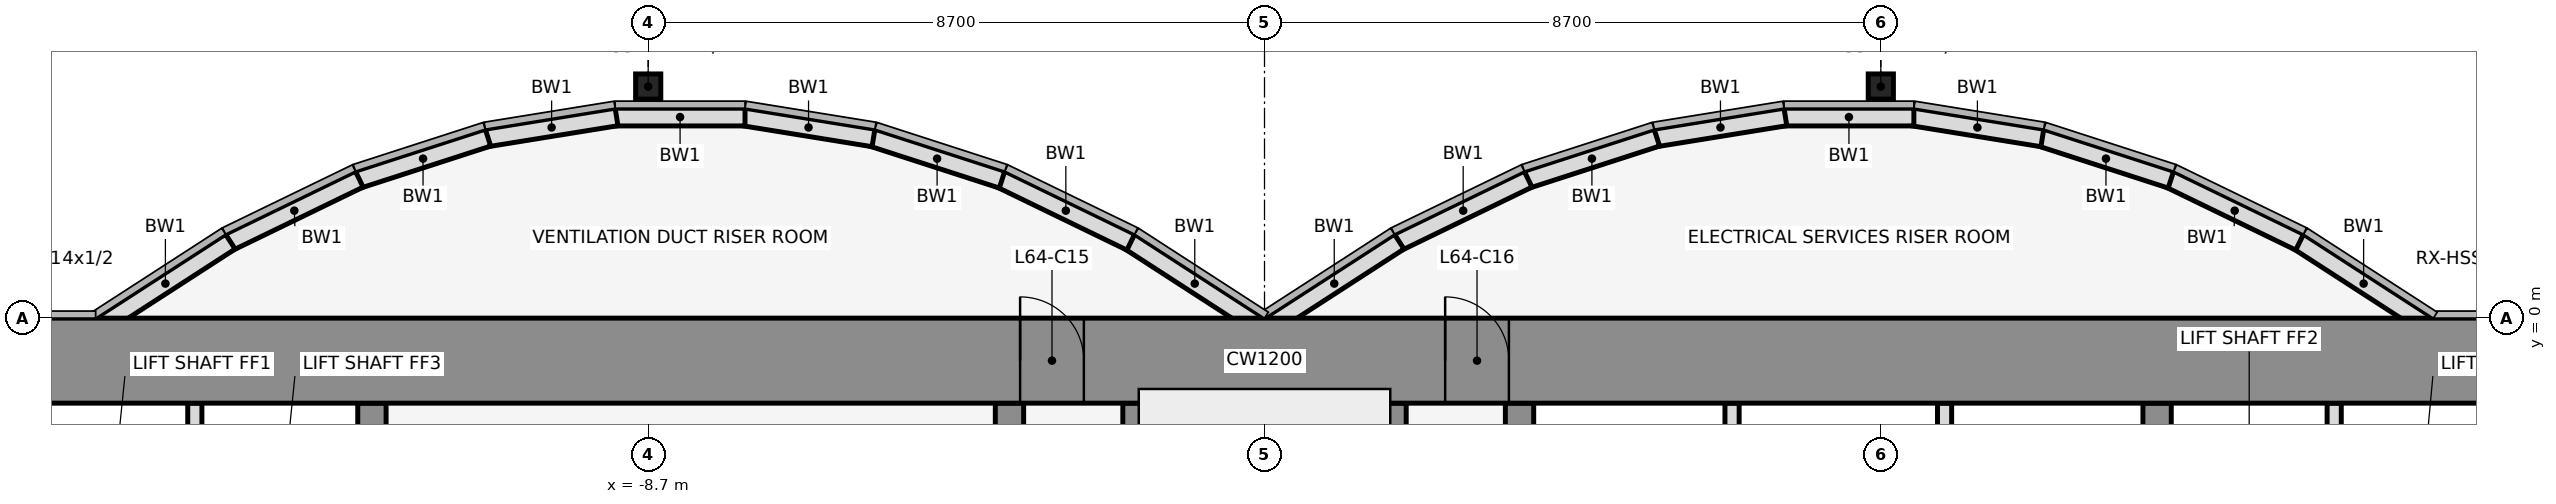
"""IFC4 building model, lengths in metres.
Left out: names, types, materials, properties, quantities, classifications, styles, units other than length and angle.
Written with IfcOpenShell. Run it as: python <this file> out.ifc"""

import sys

from ifc_helpers import new_model, si_unit, direction, frame, frame_2d, origin, origin_2d, place, context, subcontext, project, spatial, rectangle, hollow_rectangle, extrude, element, fill, save


model = new_model("IFC4")
c1 = context("Model", 3, precision=1e-05, world=origin(), true_north=direction((0.0, 1.0)))
c2 = subcontext(c1, "Body", "Model", "MODEL_VIEW")
j1 = project(units=[si_unit("LENGTHUNIT", "METRE"), si_unit("PLANEANGLEUNIT", "RADIAN")], contexts=[c1])
p1 = place(None, origin())
s1 = spatial("IfcSite", under=j1, at=p1, CompositionType="ELEMENT")
p2 = place(p1, origin())
s2 = spatial("IfcBuilding", under=s1, at=p2, CompositionType="ELEMENT")
p3 = place(p2, frame((0.0, 0.0, 283.4)))
s3 = spatial("IfcBuildingStorey", under=s2, at=p3, CompositionType="ELEMENT", Elevation=283.4)
for number, where, z_axis, x_axis in (
    (1, (-8.7, 3.269, 0.0), (0.0, 0.0, 1.0), (1.0, 0.0, 0.0)),
    (2, (8.7, 3.269, 0.0), (0.0, 0.0, 1.0), (1.0, 0.0, 0.0)),
):
    element("IfcColumn", number, at=place(p3, frame(where, z_axis=z_axis, x_axis=x_axis)), inside=s3, PredefinedType="COLUMN", context=c2, shape_type="SweptSolid", body=[
        extrude(hollow_rectangle(XDim=0.356, YDim=0.356, WallThickness=0.012, at=origin_2d()), origin(), (0.0, 0.0, 1.0), 4.2),
    ])
p4 = place(p3, frame((16.432, -0.105, 0.0), z_axis=(0.0, 0.0, 1.0), x_axis=(-0.83981312244, 0.542875602121, 0.0)))
e3 = element("IfcWall", 3, at=p4, inside=s3, PredefinedType="STANDARD", context=c2, shape_type="SweptSolid", body=[
    extrude(rectangle(XDim=2.183, YDim=0.25, at=frame_2d((1.091, 0.0))), origin(), (0.0, 0.0, 1.0), 4.0),
])
p5 = place(p3, frame((14.612, 1.073, 0.0), z_axis=(0.0, 0.0, 1.0), x_axis=(-0.89982408427, 0.436252928206, 0.0)))
e4 = element("IfcWall", 4, at=p5, inside=s3, PredefinedType="STANDARD", context=c2, shape_type="SweptSolid", body=[
    extrude(rectangle(XDim=2.038, YDim=0.25, at=frame_2d((1.019, 0.0))), origin(), (0.0, 0.0, 1.0), 4.0),
])
p6 = place(p3, frame((12.795, 1.955, 0.0), z_axis=(0.0, 0.0, 1.0), x_axis=(-0.951495806175, 0.307661714928, 0.0)))
e5 = element("IfcWall", 5, at=p6, inside=s3, PredefinedType="STANDARD", context=c2, shape_type="SweptSolid", body=[
    extrude(rectangle(XDim=1.927, YDim=0.25, at=frame_2d((0.963, 0.0))), origin(), (0.0, 0.0, 1.0), 4.0),
])
p7 = place(p3, frame((10.98, 2.543, 0.0), z_axis=(0.0, 0.0, 1.0), x_axis=(-0.987181718931, 0.159600293885, 0.0)))
e6 = element("IfcWall", 6, at=p7, inside=s3, PredefinedType="STANDARD", context=c2, shape_type="SweptSolid", body=[
    extrude(rectangle(XDim=1.857, YDim=0.25, at=frame_2d((0.929, 0.0))), origin(), (0.0, 0.0, 1.0), 4.0),
])
p8 = place(p3, frame((9.167, 2.838, 0.0), z_axis=(0.0, 0.0, 1.0), x_axis=(-1.0, 0.0, 0.0)))
e7 = element("IfcWall", 7, at=p8, inside=s3, PredefinedType="STANDARD", context=c2, shape_type="SweptSolid", body=[
    extrude(rectangle(XDim=1.833, YDim=0.25, at=frame_2d((0.917, 0.0))), origin(), (0.0, 0.0, 1.0), 4.0),
])
p9 = place(p3, frame((7.353, 2.84, 0.0), z_axis=(0.0, 0.0, 1.0), x_axis=(-0.987181718931, -0.159600293885, 0.0)))
e8 = element("IfcWall", 8, at=p9, inside=s3, PredefinedType="STANDARD", context=c2, shape_type="SweptSolid", body=[
    extrude(rectangle(XDim=1.857, YDim=0.25, at=frame_2d((0.929, 0.0))), origin(), (0.0, 0.0, 1.0), 4.0),
])
p10 = place(p3, frame((5.538, 2.548, 0.0), z_axis=(0.0, 0.0, 1.0), x_axis=(-0.951495806175, -0.307661714928, 0.0)))
e9 = element("IfcWall", 9, at=p10, inside=s3, PredefinedType="STANDARD", context=c2, shape_type="SweptSolid", body=[
    extrude(rectangle(XDim=1.927, YDim=0.25, at=frame_2d((0.963, 0.0))), origin(), (0.0, 0.0, 1.0), 4.0),
])
p11 = place(p3, frame((3.721, 1.962, 0.0), z_axis=(0.0, 0.0, 1.0), x_axis=(-0.89982408427, -0.436252928206, 0.0)))
e10 = element("IfcWall", 10, at=p11, inside=s3, PredefinedType="STANDARD", context=c2, shape_type="SweptSolid", body=[
    extrude(rectangle(XDim=2.038, YDim=0.25, at=frame_2d((1.019, 0.0))), origin(), (0.0, 0.0, 1.0), 4.0),
])
for number, where, z_axis, x_axis in (
    (11, (1.901, 1.08, 0.0), (0.0, 0.0, 1.0), (-0.84, -0.543, 0.0)),
    (12, (-0.068, -0.105, 0.0), (0.0, 0.0, 1.0), (-0.84, 0.543, 0.0)),
):
    element("IfcWall", number, at=place(p3, frame(where, z_axis=z_axis, x_axis=x_axis)), inside=s3, PredefinedType="STANDARD", context=c2, shape_type="SweptSolid", body=[
        extrude(rectangle(XDim=2.183, YDim=0.25, at=frame_2d((1.091, 0.0))), origin(), (0.0, 0.0, 1.0), 4.0),
    ])
p12 = place(p3, frame((-1.888, 1.073, 0.0), z_axis=(0.0, 0.0, 1.0), x_axis=(-0.89982408427, 0.436252928206, 0.0)))
e13 = element("IfcWall", 13, at=p12, inside=s3, PredefinedType="STANDARD", context=c2, shape_type="SweptSolid", body=[
    extrude(rectangle(XDim=2.038, YDim=0.25, at=frame_2d((1.019, 0.0))), origin(), (0.0, 0.0, 1.0), 4.0),
])
p13 = place(p3, frame((-3.705, 1.955, 0.0), z_axis=(0.0, 0.0, 1.0), x_axis=(-0.951495806175, 0.307661714928, 0.0)))
e14 = element("IfcWall", 14, at=p13, inside=s3, PredefinedType="STANDARD", context=c2, shape_type="SweptSolid", body=[
    extrude(rectangle(XDim=1.927, YDim=0.25, at=frame_2d((0.963, 0.0))), origin(), (0.0, 0.0, 1.0), 4.0),
])
p14 = place(p3, frame((-5.52, 2.543, 0.0), z_axis=(0.0, 0.0, 1.0), x_axis=(-0.987181718931, 0.159600293885, 0.0)))
e15 = element("IfcWall", 15, at=p14, inside=s3, PredefinedType="STANDARD", context=c2, shape_type="SweptSolid", body=[
    extrude(rectangle(XDim=1.857, YDim=0.25, at=frame_2d((0.929, 0.0))), origin(), (0.0, 0.0, 1.0), 4.0),
])
p15 = place(p3, frame((-7.333, 2.838, 0.0), z_axis=(0.0, 0.0, 1.0), x_axis=(-1.0, 0.0, 0.0)))
e16 = element("IfcWall", 16, at=p15, inside=s3, PredefinedType="STANDARD", context=c2, shape_type="SweptSolid", body=[
    extrude(rectangle(XDim=1.833, YDim=0.25, at=frame_2d((0.917, 0.0))), origin(), (0.0, 0.0, 1.0), 4.0),
])
p16 = place(p3, frame((-9.147, 2.84, 0.0), z_axis=(0.0, 0.0, 1.0), x_axis=(-0.987181718931, -0.159600293885, 0.0)))
e17 = element("IfcWall", 17, at=p16, inside=s3, PredefinedType="STANDARD", context=c2, shape_type="SweptSolid", body=[
    extrude(rectangle(XDim=1.857, YDim=0.25, at=frame_2d((0.929, 0.0))), origin(), (0.0, 0.0, 1.0), 4.0),
])
p17 = place(p3, frame((-10.962, 2.548, 0.0), z_axis=(0.0, 0.0, 1.0), x_axis=(-0.951495806175, -0.307661714928, 0.0)))
e18 = element("IfcWall", 18, at=p17, inside=s3, PredefinedType="STANDARD", context=c2, shape_type="SweptSolid", body=[
    extrude(rectangle(XDim=1.927, YDim=0.25, at=frame_2d((0.963, 0.0))), origin(), (0.0, 0.0, 1.0), 4.0),
])
p18 = place(p3, frame((-12.779, 1.962, 0.0), z_axis=(0.0, 0.0, 1.0), x_axis=(-0.89982408427, -0.436252928206, 0.0)))
e19 = element("IfcWall", 19, at=p18, inside=s3, PredefinedType="STANDARD", context=c2, shape_type="SweptSolid", body=[
    extrude(rectangle(XDim=2.038, YDim=0.25, at=frame_2d((1.019, 0.0))), origin(), (0.0, 0.0, 1.0), 4.0),
])
p19 = place(p3, frame((-14.599, 1.08, 0.0), z_axis=(0.0, 0.0, 1.0), x_axis=(-0.83981312244, -0.542875602121, 0.0)))
e20 = element("IfcWall", 20, at=p19, inside=s3, PredefinedType="STANDARD", context=c2, shape_type="SweptSolid", body=[
    extrude(rectangle(XDim=2.183, YDim=0.25, at=frame_2d((1.091, 0.0))), origin(), (0.0, 0.0, 1.0), 4.0),
])
p20 = place(p3, frame((-15.1, -4.6, 0.0), z_axis=(0.0, 0.0, 1.0), x_axis=(0.0, 1.0, 0.0)))
e21 = element("IfcWall", 21, at=p20, inside=s3, PredefinedType="PARTITIONING", context=c2, shape_type="SweptSolid", body=[
    extrude(rectangle(XDim=3.4, YDim=0.2, at=frame_2d((1.7, 0.0))), origin(), (0.0, 0.0, 1.0), 3.068),
])
p21 = place(p3, frame((-12.6, -11.8, 0.0), z_axis=(0.0, 0.0, 1.0), x_axis=(0.0, 1.0, 0.0)))
e22 = element("IfcWall", 22, at=p21, inside=s3, PredefinedType="SHEAR", context=c2, shape_type="SweptSolid", body=[
    extrude(rectangle(XDim=10.6, YDim=0.4, at=frame_2d((5.3, 0.0))), origin(), (0.0, 0.0, 1.0), 4.2),
])
p22 = place(p21, frame((4.75, 0.0, 0.0)))
e23 = element("IfcOpeningElement", 23, at=p22, cuts=e22, PredefinedType="OPENING", context=c2, shape_type="SweptSolid", body=[
    extrude(rectangle(XDim=1.1, YDim=2.1, at=frame_2d((0.55, 1.05))), frame((0.0, 0.212, 0.0), z_axis=(0.0, -1.0, 0.0), x_axis=(1.0, 0.0, 0.0)), (0.0, 0.0, 1.0), 0.424),
])
p23 = place(p3, frame((-3.6, -11.8, 0.0), z_axis=(0.0, 0.0, 1.0), x_axis=(0.0, 1.0, 0.0)))
e24 = element("IfcWall", 24, at=p23, inside=s3, PredefinedType="SHEAR", context=c2, shape_type="SweptSolid", body=[
    extrude(rectangle(XDim=10.6, YDim=0.4, at=frame_2d((5.3, 0.0))), origin(), (0.0, 0.0, 1.0), 4.2),
])
p24 = place(p23, frame((4.85, 0.0, 0.0)))
e25 = element("IfcOpeningElement", 25, at=p24, cuts=e24, PredefinedType="OPENING", context=c2, shape_type="SweptSolid", body=[
    extrude(rectangle(XDim=0.9, YDim=2.1, at=frame_2d((0.45, 1.05))), frame((0.0, 0.212, 0.0), z_axis=(0.0, -1.0, 0.0), x_axis=(1.0, 0.0, 0.0)), (0.0, 0.0, 1.0), 0.424),
])
for number, where, z_axis, x_axis in (
    (26, (-1.8, -11.8, 0.0), (0.0, 0.0, 1.0), (0.0, 1.0, 0.0)),
    (27, (1.8, -11.8, 0.0), (0.0, 0.0, 1.0), (0.0, 1.0, 0.0)),
):
    element("IfcWall", number, at=place(p3, frame(where, z_axis=z_axis, x_axis=x_axis)), inside=s3, PredefinedType="SHEAR", context=c2, shape_type="SweptSolid", body=[
        extrude(rectangle(XDim=10.6, YDim=0.4, at=frame_2d((5.3, 0.0))), origin(), (0.0, 0.0, 1.0), 4.2),
    ])
p25 = place(p3, frame((3.6, -11.8, 0.0), z_axis=(0.0, 0.0, 1.0), x_axis=(0.0, 1.0, 0.0)))
e28 = element("IfcWall", 28, at=p25, inside=s3, PredefinedType="SHEAR", context=c2, shape_type="SweptSolid", body=[
    extrude(rectangle(XDim=10.6, YDim=0.4, at=frame_2d((5.3, 0.0))), origin(), (0.0, 0.0, 1.0), 4.2),
])
p26 = place(p25, frame((1.35, 0.0, 0.0)))
e29 = element("IfcOpeningElement", 29, at=p26, cuts=e28, PredefinedType="OPENING", context=c2, shape_type="SweptSolid", body=[
    extrude(rectangle(XDim=0.9, YDim=2.1, at=frame_2d((0.45, 1.05))), frame((0.0, 0.212, 0.0), z_axis=(0.0, -1.0, 0.0), x_axis=(1.0, 0.0, 0.0)), (0.0, 0.0, 1.0), 0.424),
])
for number, where, z_axis, x_axis in (
    (30, (6.6, -4.6, 0.0), (0.0, 0.0, 1.0), (0.0, 1.0, 0.0)),
    (31, (9.6, -4.6, 0.0), (0.0, 0.0, 1.0), (0.0, 1.0, 0.0)),
):
    element("IfcWall", number, at=place(p3, frame(where, z_axis=z_axis, x_axis=x_axis)), inside=s3, PredefinedType="PARTITIONING", context=c2, shape_type="SweptSolid", body=[
        extrude(rectangle(XDim=3.4, YDim=0.2, at=frame_2d((1.7, 0.0))), origin(), (0.0, 0.0, 1.0), 3.068),
    ])
p27 = place(p3, frame((12.6, -11.8, 0.0), z_axis=(0.0, 0.0, 1.0), x_axis=(0.0, 1.0, 0.0)))
e32 = element("IfcWall", 32, at=p27, inside=s3, PredefinedType="SHEAR", context=c2, shape_type="SweptSolid", body=[
    extrude(rectangle(XDim=10.6, YDim=0.4, at=frame_2d((5.3, 0.0))), origin(), (0.0, 0.0, 1.0), 4.2),
])
p28 = place(p27, frame((4.75, 0.0, 0.0)))
e33 = element("IfcOpeningElement", 33, at=p28, cuts=e32, PredefinedType="OPENING", context=c2, shape_type="SweptSolid", body=[
    extrude(rectangle(XDim=1.1, YDim=2.1, at=frame_2d((0.55, 1.05))), frame((0.0, 0.212, 0.0), z_axis=(0.0, -1.0, 0.0), x_axis=(1.0, 0.0, 0.0)), (0.0, 0.0, 1.0), 0.424),
])
p29 = place(p3, frame((15.1, -4.6, 0.0), z_axis=(0.0, 0.0, 1.0), x_axis=(0.0, 1.0, 0.0)))
e34 = element("IfcWall", 34, at=p29, inside=s3, PredefinedType="PARTITIONING", context=c2, shape_type="SweptSolid", body=[
    extrude(rectangle(XDim=3.4, YDim=0.2, at=frame_2d((1.7, 0.0))), origin(), (0.0, 0.0, 1.0), 3.068),
])
p30 = place(p3, frame((-22.0, -0.6, 0.0), z_axis=(0.0, 0.0, 1.0), x_axis=(1.0, 0.0, 0.0)))
e35 = element("IfcWall", 35, at=p30, inside=s3, PredefinedType="SHEAR", context=c2, shape_type="SweptSolid", body=[
    extrude(rectangle(XDim=44.0, YDim=1.2, at=frame_2d((22.0, 0.0))), origin(), (0.0, 0.0, 1.0), 4.2),
])
p31 = place(p30, frame((18.55, 0.0, 0.0)))
e36 = element("IfcOpeningElement", 36, at=p31, cuts=e35, PredefinedType="OPENING", context=c2, shape_type="SweptSolid", body=[
    extrude(rectangle(XDim=0.9, YDim=2.1, at=frame_2d((0.45, 1.05))), frame((0.0, 0.612, 0.0), z_axis=(0.0, -1.0, 0.0), x_axis=(1.0, 0.0, 0.0)), (0.0, 0.0, 1.0), 1.224),
])
p32 = place(p30, frame((24.55, 0.0, 0.0)))
e37 = element("IfcOpeningElement", 37, at=p32, cuts=e35, PredefinedType="OPENING", context=c2, shape_type="SweptSolid", body=[
    extrude(rectangle(XDim=0.9, YDim=2.1, at=frame_2d((0.45, 1.05))), frame((0.0, 0.612, 0.0), z_axis=(0.0, -1.0, 0.0), x_axis=(1.0, 0.0, 0.0)), (0.0, 0.0, 1.0), 1.224),
])
p33 = place(p31, origin())
e38 = element("IfcDoor", 38, at=p33, inside=s3, OperationType="SINGLE_SWING_LEFT", PredefinedType="DOOR", context=c2, shape_type="SweptSolid", body=[
    extrude(rectangle(XDim=0.9, YDim=2.1, at=frame_2d((0.45, 1.05))), frame((0.0, 0.025, 0.0), z_axis=(0.0, -1.0, 0.0), x_axis=(1.0, 0.0, 0.0)), (0.0, 0.0, 1.0), 0.05),
])
fill(e36, e38)
p34 = place(p32, origin())
e39 = element("IfcDoor", 39, at=p34, inside=s3, OperationType="SINGLE_SWING_LEFT", PredefinedType="DOOR", context=c2, shape_type="SweptSolid", body=[
    extrude(rectangle(XDim=0.9, YDim=2.1, at=frame_2d((0.45, 1.05))), frame((0.0, 0.025, 0.0), z_axis=(0.0, -1.0, 0.0), x_axis=(1.0, 0.0, 0.0)), (0.0, 0.0, 1.0), 0.05),
])
fill(e37, e39)
save(model, sys.argv[1])
